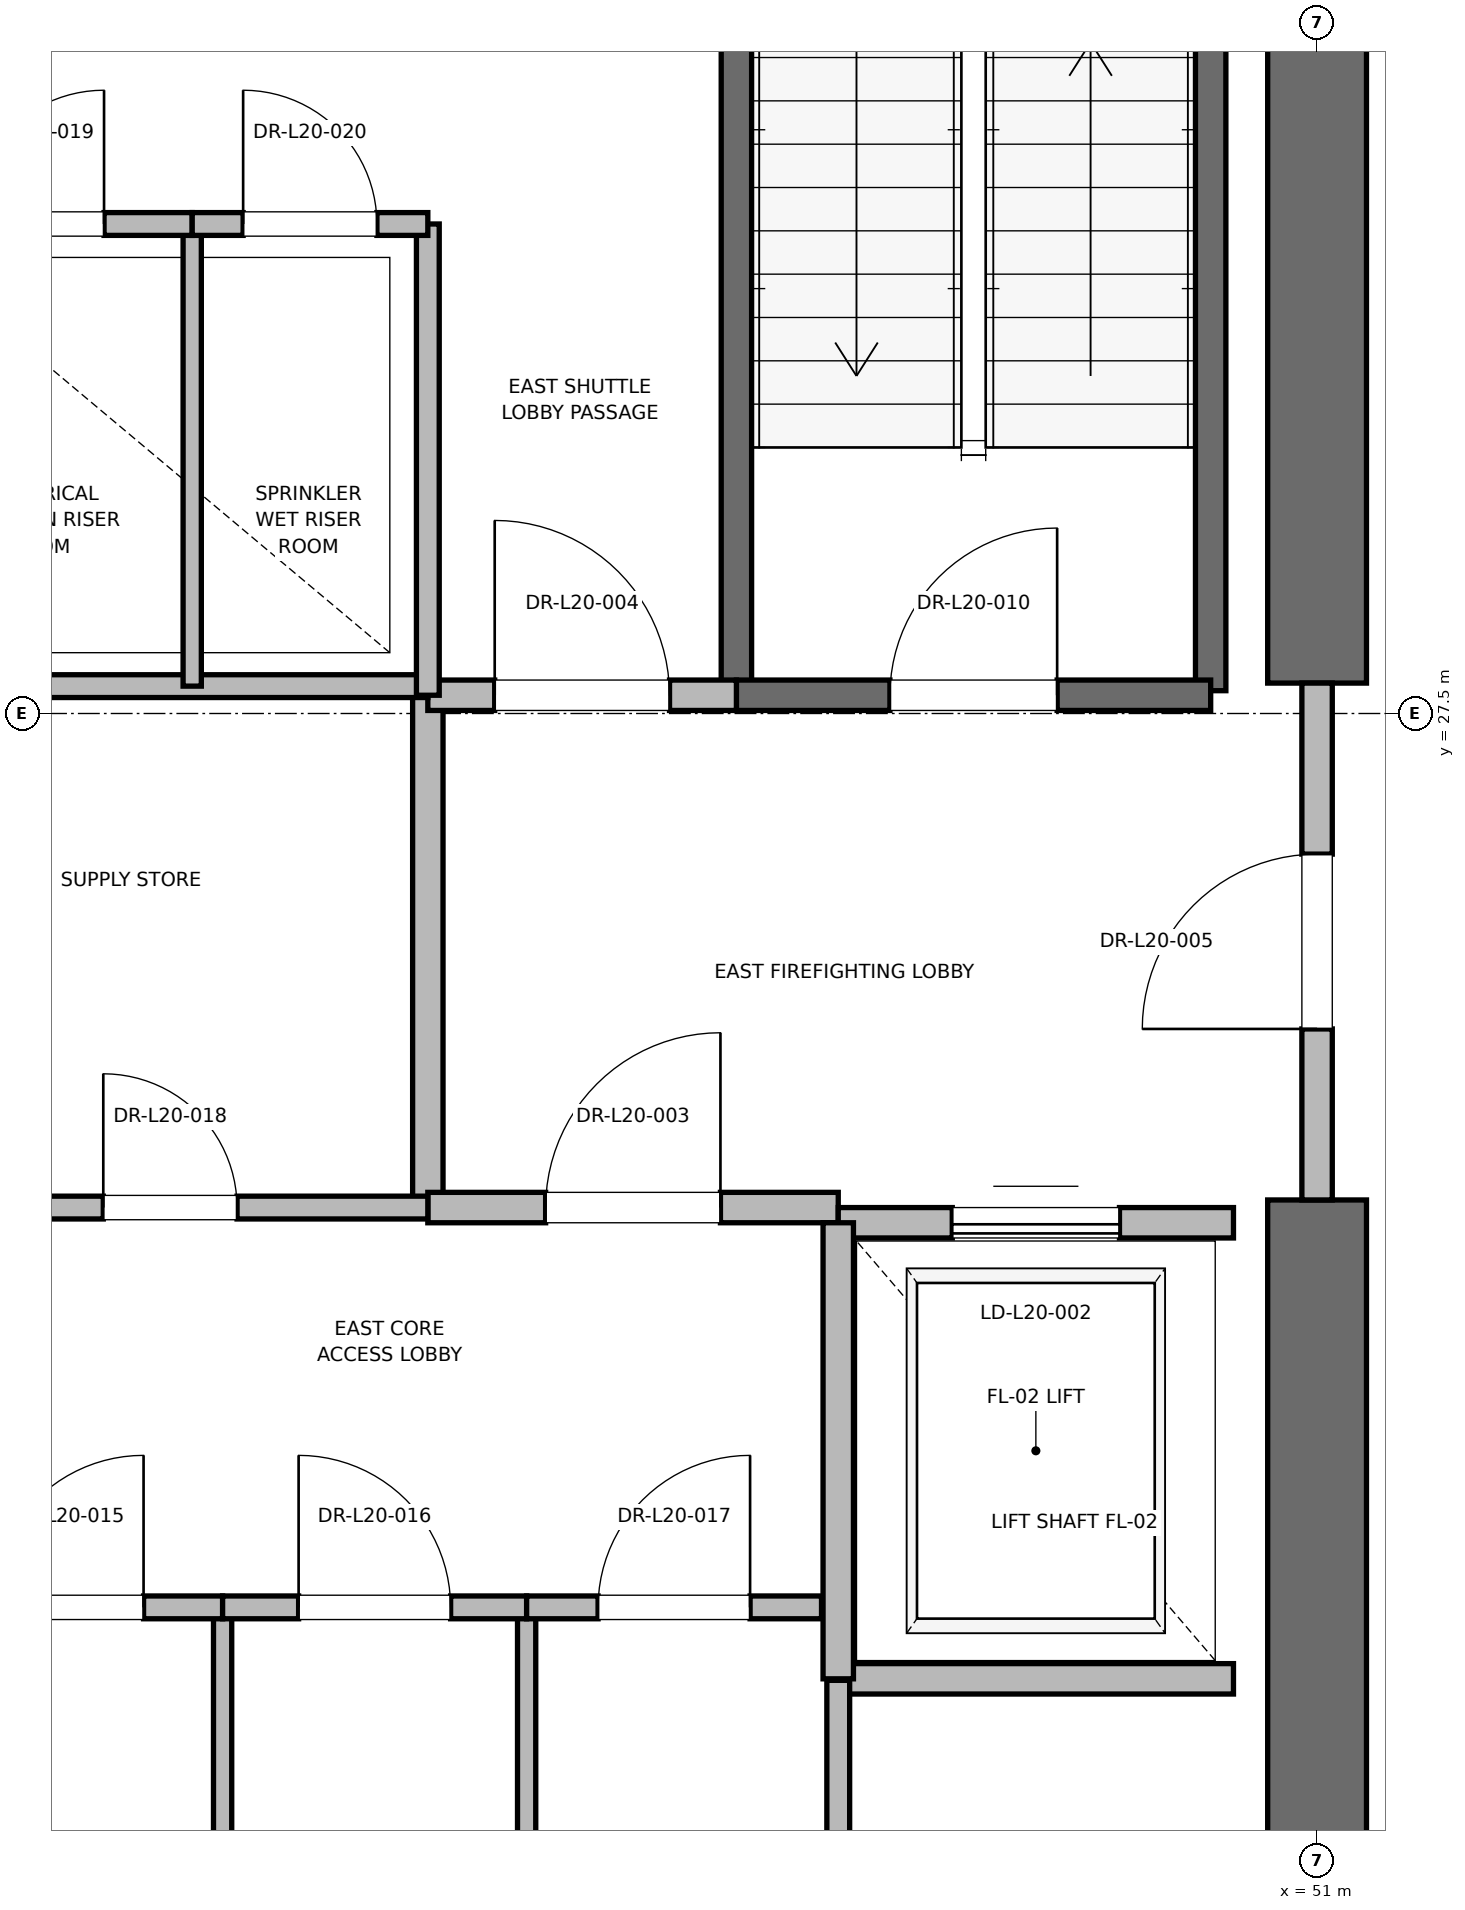
"""IFC4 building model, lengths in metres.
Left out: names, types, materials, properties, quantities, classifications, styles, units other than length and angle.
Written with IfcOpenShell. Run it as: python <this file> out.ifc"""

import sys

from ifc_helpers import new_model, si_unit, direction, frame, frame_2d, origin, place, context, subcontext, project, spatial, rectangle, extrude, element, fill, save


model = new_model("IFC4")
c1 = context("Model", 3, precision=1e-05, world=origin(), true_north=direction((0.0, 1.0)))
c2 = subcontext(c1, "Body", "Model", "MODEL_VIEW")
j1 = project(units=[si_unit("LENGTHUNIT", "METRE"), si_unit("PLANEANGLEUNIT", "RADIAN")], contexts=[c1])
p1 = place(None, origin())
s1 = spatial("IfcSite", under=j1, at=p1, CompositionType="ELEMENT")
p2 = place(p1, origin())
s2 = spatial("IfcBuilding", under=s1, at=p2, CompositionType="ELEMENT")
p3 = place(p2, frame((0.0, 0.0, 87.6)))
s3 = spatial("IfcBuildingStorey", under=s2, at=p3, CompositionType="ELEMENT", Elevation=87.6)
p4 = place(p3, frame((51.0, 18.5, 0.0), z_axis=(0.0, 0.0, 1.0), x_axis=(0.0, 1.0, 0.0)))
e1 = element("IfcWall", 1, at=p4, inside=s3, PredefinedType="SHEAR", context=c2, shape_type="SweptSolid", body=[
    extrude(rectangle(XDim=5.8, YDim=0.65, at=frame_2d((2.9, 0.0))), origin(), (0.0, 0.0, 1.0), 3.76),
])
p5 = place(p3, frame((51.0, 27.7, 0.0), z_axis=(0.0, 0.0, 1.0), x_axis=(0.0, 1.0, 0.0)))
e2 = element("IfcWall", 2, at=p5, inside=s3, PredefinedType="SHEAR", context=c2, shape_type="SweptSolid", body=[
    extrude(rectangle(XDim=8.8, YDim=0.65, at=frame_2d((4.4, 0.0))), origin(), (0.0, 0.0, 1.0), 3.76),
])
p6 = place(p3, frame((50.3, 27.65, 0.0), z_axis=(0.0, 0.0, 1.0), x_axis=(0.0, 1.0, 0.0)))
e3 = element("IfcWall", 3, at=p6, inside=s3, PredefinedType="SOLIDWALL", context=c2, shape_type="SweptSolid", body=[
    extrude(rectangle(XDim=8.15, YDim=0.2, at=frame_2d((4.075, 0.0))), origin(), (0.0, 0.0, 1.0), 3.76),
])
p7 = place(p3, frame((47.18, 27.62, 0.0), z_axis=(0.0, 0.0, 1.0), x_axis=(0.0, 1.0, 0.0)))
e4 = element("IfcWall", 4, at=p7, inside=s3, PredefinedType="SOLIDWALL", context=c2, shape_type="SweptSolid", body=[
    extrude(rectangle(XDim=8.18, YDim=0.2, at=frame_2d((4.09, 0.0))), origin(), (0.0, 0.0, 1.0), 3.76),
])
p8 = place(p3, frame((47.18, 27.62, 0.0), z_axis=(0.0, 0.0, 1.0), x_axis=(1.0, 0.0, 0.0)))
e5 = element("IfcWall", 5, at=p8, inside=s3, PredefinedType="SOLIDWALL", context=c2, shape_type="SweptSolid", body=[
    extrude(rectangle(XDim=3.12, YDim=0.2, at=frame_2d((1.56, 0.0))), origin(), (0.0, 0.0, 1.0), 3.76),
])
p9 = place(p8, frame((1.01, 0.0, 0.0)))
e6 = element("IfcOpeningElement", 6, at=p9, cuts=e5, PredefinedType="OPENING", context=c2, shape_type="SweptSolid", body=[
    extrude(rectangle(XDim=1.1, YDim=2.15, at=frame_2d((0.55, 1.075))), frame((0.0, 0.1, 0.0), z_axis=(0.0, -1.0, 0.0), x_axis=(1.0, 0.0, 0.0)), (0.0, 0.0, 1.0), 0.2),
])
p10 = place(p3, frame((45.15, 24.25, 0.0), z_axis=(0.0, 0.0, 1.0), x_axis=(0.0, 1.0, 0.0)))
e7 = element("IfcWall", 7, at=p10, inside=s3, PredefinedType="PARTITIONING", context=c2, shape_type="SweptSolid", body=[
    extrude(rectangle(XDim=3.37, YDim=0.2, at=frame_2d((1.685, 0.0))), origin(), (0.0, 0.0, 1.0), 3.76),
])
p11 = place(p3, frame((45.15, 24.25, 0.0), z_axis=(0.0, 0.0, 1.0), x_axis=(1.0, 0.0, 0.0)))
e8 = element("IfcWall", 8, at=p11, inside=s3, PredefinedType="PARTITIONING", context=c2, shape_type="SweptSolid", body=[
    extrude(rectangle(XDim=2.7, YDim=0.2, at=frame_2d((1.35, 0.0))), origin(), (0.0, 0.0, 1.0), 3.76),
])
p12 = place(p11, frame((0.775, 0.0, 0.0)))
e9 = element("IfcOpeningElement", 9, at=p12, cuts=e8, PredefinedType="OPENING", context=c2, shape_type="SweptSolid", body=[
    extrude(rectangle(XDim=1.15, YDim=2.2, at=frame_2d((0.575, 1.1))), frame((0.0, 0.1, 0.0), z_axis=(0.0, -1.0, 0.0), x_axis=(1.0, 0.0, 0.0)), (0.0, 0.0, 1.0), 0.2),
])
p13 = place(p3, frame((45.15, 27.62, 0.0), z_axis=(0.0, 0.0, 1.0), x_axis=(1.0, 0.0, 0.0)))
e10 = element("IfcWall", 10, at=p13, inside=s3, PredefinedType="PARTITIONING", context=c2, shape_type="SweptSolid", body=[
    extrude(rectangle(XDim=2.03, YDim=0.2, at=frame_2d((1.015, 0.0))), origin(), (0.0, 0.0, 1.0), 3.76),
])
p14 = place(p13, frame((0.44, 0.0, 0.0)))
e11 = element("IfcOpeningElement", 11, at=p14, cuts=e10, PredefinedType="OPENING", context=c2, shape_type="SweptSolid", body=[
    extrude(rectangle(XDim=1.15, YDim=2.2, at=frame_2d((0.575, 1.1))), frame((0.0, 0.1, 0.0), z_axis=(0.0, -1.0, 0.0), x_axis=(1.0, 0.0, 0.0)), (0.0, 0.0, 1.0), 0.2),
])
p15 = place(p3, frame((51.0, 24.3, 0.0), z_axis=(0.0, 0.0, 1.0), x_axis=(0.0, 1.0, 0.0)))
e12 = element("IfcWall", 12, at=p15, inside=s3, PredefinedType="PARTITIONING", context=c2, shape_type="SweptSolid", body=[
    extrude(rectangle(XDim=3.4, YDim=0.2, at=frame_2d((1.7, 0.0))), origin(), (0.0, 0.0, 1.0), 2.54),
])
p16 = place(p15, frame((1.125, 0.0, 0.0)))
e13 = element("IfcOpeningElement", 13, at=p16, cuts=e12, PredefinedType="OPENING", context=c2, shape_type="SweptSolid", body=[
    extrude(rectangle(XDim=1.15, YDim=2.2, at=frame_2d((0.575, 1.1))), frame((0.0, 0.1, 0.0), z_axis=(0.0, -1.0, 0.0), x_axis=(1.0, 0.0, 0.0)), (0.0, 0.0, 1.0), 0.2),
])
p17 = place(p3, frame((47.85, 21.15, 0.0), z_axis=(0.0, 0.0, 1.0), x_axis=(1.0, 0.0, 0.0)))
e14 = element("IfcWall", 14, at=p17, inside=s3, PredefinedType="SOLIDWALL", context=c2, shape_type="SweptSolid", body=[
    extrude(rectangle(XDim=2.6, YDim=0.2, at=frame_2d((1.3, 0.0))), origin(), (0.0, 0.0, 1.0), 3.76),
])
p18 = place(p3, frame((50.45, 24.15, 0.0), z_axis=(0.0, 0.0, 1.0), x_axis=(-1.0, 0.0, 0.0)))
e15 = element("IfcWall", 15, at=p18, inside=s3, PredefinedType="SOLIDWALL", context=c2, shape_type="SweptSolid", body=[
    extrude(rectangle(XDim=2.6, YDim=0.2, at=frame_2d((1.3, 0.0))), origin(), (0.0, 0.0, 1.0), 2.54),
])
p19 = place(p18, frame((0.75, 0.0, 0.0)))
e16 = element("IfcOpeningElement", 16, at=p19, cuts=e15, PredefinedType="OPENING", context=c2, shape_type="SweptSolid", body=[
    extrude(rectangle(XDim=1.1, YDim=2.2, at=frame_2d((0.55, 1.1))), frame((0.0, 0.1, 0.0), z_axis=(0.0, -1.0, 0.0), x_axis=(1.0, 0.0, 0.0)), (0.0, 0.0, 1.0), 0.2),
])
p20 = place(p3, frame((47.85, 24.15, 0.0), z_axis=(0.0, 0.0, 1.0), x_axis=(0.0, -1.0, 0.0)))
e17 = element("IfcWall", 17, at=p20, inside=s3, PredefinedType="SOLIDWALL", context=c2, shape_type="SweptSolid", body=[
    extrude(rectangle(XDim=3.0, YDim=0.2, at=frame_2d((1.5, 0.0))), origin(), (0.0, 0.0, 1.0), 3.76),
])
p21 = place(p3, frame((41.56, 27.68, 0.0), z_axis=(0.0, 0.0, 1.0), x_axis=(1.0, 0.0, 0.0)))
e18 = element("IfcWall", 18, at=p21, inside=s3, PredefinedType="PARTITIONING", context=c2, shape_type="SweptSolid", body=[
    extrude(rectangle(XDim=3.59, YDim=0.15, at=frame_2d((1.795, 0.0))), origin(), (0.0, 0.0, 1.0), 2.85),
])
p22 = place(p3, frame((47.85, 18.6, 0.0), z_axis=(0.0, 0.0, 1.0), x_axis=(0.0, 1.0, 0.0)))
e19 = element("IfcWall", 19, at=p22, inside=s3, PredefinedType="PARTITIONING", context=c2, shape_type="SweptSolid", body=[
    extrude(rectangle(XDim=2.54, YDim=0.15, at=frame_2d((1.27, 0.0))), origin(), (0.0, 0.0, 1.0), 2.85),
])
for number, where, z_axis, x_axis in (
    (20, (43.8, 18.6, 0.0), (0.0, 0.0, 1.0), (0.0, 1.0, 0.0)),
    (21, (45.8, 18.6, 0.0), (0.0, 0.0, 1.0), (0.0, 1.0, 0.0)),
):
    element("IfcWall", number, at=place(p3, frame(where, z_axis=z_axis, x_axis=x_axis)), inside=s3, PredefinedType="PARTITIONING", context=c2, shape_type="SweptSolid", body=[
        extrude(rectangle(XDim=3.02, YDim=0.12, at=frame_2d((1.51, 0.0))), origin(), (0.0, 0.0, 1.0), 2.85),
    ])
p23 = place(p3, frame((41.76, 21.62, 0.0), z_axis=(0.0, 0.0, 1.0), x_axis=(1.0, 0.0, 0.0)))
e22 = element("IfcWall", 22, at=p23, inside=s3, PredefinedType="PARTITIONING", context=c2, shape_type="SweptSolid", body=[
    extrude(rectangle(XDim=2.04, YDim=0.15, at=frame_2d((1.02, 0.0))), origin(), (0.0, 0.0, 1.0), 2.85),
])
p24 = place(p23, frame((0.52, 0.0, 0.0)))
e23 = element("IfcOpeningElement", 23, at=p24, cuts=e22, PredefinedType="OPENING", context=c2, shape_type="SweptSolid", body=[
    extrude(rectangle(XDim=1.0, YDim=2.15, at=frame_2d((0.5, 1.075))), frame((0.0, 0.075, 0.0), z_axis=(0.0, -1.0, 0.0), x_axis=(1.0, 0.0, 0.0)), (0.0, 0.0, 1.0), 0.15),
])
p25 = place(p3, frame((43.8, 21.62, 0.0), z_axis=(0.0, 0.0, 1.0), x_axis=(1.0, 0.0, 0.0)))
e24 = element("IfcWall", 24, at=p25, inside=s3, PredefinedType="PARTITIONING", context=c2, shape_type="SweptSolid", body=[
    extrude(rectangle(XDim=2.0, YDim=0.15, at=frame_2d((1.0, 0.0))), origin(), (0.0, 0.0, 1.0), 2.85),
])
p26 = place(p25, frame((0.5, 0.0, 0.0)))
e25 = element("IfcOpeningElement", 25, at=p26, cuts=e24, PredefinedType="OPENING", context=c2, shape_type="SweptSolid", body=[
    extrude(rectangle(XDim=1.0, YDim=2.15, at=frame_2d((0.5, 1.075))), frame((0.0, 0.075, 0.0), z_axis=(0.0, -1.0, 0.0), x_axis=(1.0, 0.0, 0.0)), (0.0, 0.0, 1.0), 0.15),
])
p27 = place(p3, frame((45.8, 21.62, 0.0), z_axis=(0.0, 0.0, 1.0), x_axis=(1.0, 0.0, 0.0)))
e26 = element("IfcWall", 26, at=p27, inside=s3, PredefinedType="PARTITIONING", context=c2, shape_type="SweptSolid", body=[
    extrude(rectangle(XDim=1.94, YDim=0.15, at=frame_2d((0.97, 0.0))), origin(), (0.0, 0.0, 1.0), 2.85),
])
p28 = place(p27, frame((0.47, 0.0, 0.0)))
e27 = element("IfcOpeningElement", 27, at=p28, cuts=e26, PredefinedType="OPENING", context=c2, shape_type="SweptSolid", body=[
    extrude(rectangle(XDim=1.0, YDim=2.15, at=frame_2d((0.5, 1.075))), frame((0.0, 0.075, 0.0), z_axis=(0.0, -1.0, 0.0), x_axis=(1.0, 0.0, 0.0)), (0.0, 0.0, 1.0), 0.15),
])
p29 = place(p3, frame((41.76, 24.25, 0.0), z_axis=(0.0, 0.0, 1.0), x_axis=(1.0, 0.0, 0.0)))
e28 = element("IfcWall", 28, at=p29, inside=s3, PredefinedType="PARTITIONING", context=c2, shape_type="SweptSolid", body=[
    extrude(rectangle(XDim=3.39, YDim=0.15, at=frame_2d((1.695, 0.0))), origin(), (0.0, 0.0, 1.0), 2.85),
])
p30 = place(p29, frame((1.255, 0.0, 0.0)))
e29 = element("IfcOpeningElement", 29, at=p30, cuts=e28, PredefinedType="OPENING", context=c2, shape_type="SweptSolid", body=[
    extrude(rectangle(XDim=0.88, YDim=2.1, at=frame_2d((0.44, 1.05))), frame((0.0, 0.075, 0.0), z_axis=(0.0, -1.0, 0.0), x_axis=(1.0, 0.0, 0.0)), (0.0, 0.0, 1.0), 0.15),
])
p31 = place(p3, frame((45.15, 27.62, 0.0), z_axis=(0.0, 0.0, 1.0), x_axis=(0.0, 1.0, 0.0)))
e30 = element("IfcWall", 30, at=p31, inside=s3, PredefinedType="PARTITIONING", context=c2, shape_type="SweptSolid", body=[
    extrude(rectangle(XDim=3.1, YDim=0.15, at=frame_2d((1.55, 0.0))), origin(), (0.0, 0.0, 1.0), 2.85),
])
p32 = place(p3, frame((43.6, 27.68, 0.0), z_axis=(0.0, 0.0, 1.0), x_axis=(0.0, 1.0, 0.0)))
e31 = element("IfcWall", 31, at=p32, inside=s3, PredefinedType="PARTITIONING", context=c2, shape_type="SweptSolid", body=[
    extrude(rectangle(XDim=3.04, YDim=0.12, at=frame_2d((1.52, 0.0))), origin(), (0.0, 0.0, 1.0), 2.85),
])
p33 = place(p3, frame((41.56, 30.72, 0.0), z_axis=(0.0, 0.0, 1.0), x_axis=(1.0, 0.0, 0.0)))
e32 = element("IfcWall", 32, at=p33, inside=s3, PredefinedType="PARTITIONING", context=c2, shape_type="SweptSolid", body=[
    extrude(rectangle(XDim=2.04, YDim=0.15, at=frame_2d((1.02, 0.0))), origin(), (0.0, 0.0, 1.0), 2.85),
])
p34 = place(p33, frame((0.58, 0.0, 0.0)))
e33 = element("IfcOpeningElement", 33, at=p34, cuts=e32, PredefinedType="OPENING", context=c2, shape_type="SweptSolid", body=[
    extrude(rectangle(XDim=0.88, YDim=2.1, at=frame_2d((0.44, 1.05))), frame((0.0, 0.075, 0.0), z_axis=(0.0, -1.0, 0.0), x_axis=(1.0, 0.0, 0.0)), (0.0, 0.0, 1.0), 0.15),
])
p35 = place(p3, frame((43.6, 30.72, 0.0), z_axis=(0.0, 0.0, 1.0), x_axis=(1.0, 0.0, 0.0)))
e34 = element("IfcWall", 34, at=p35, inside=s3, PredefinedType="PARTITIONING", context=c2, shape_type="SweptSolid", body=[
    extrude(rectangle(XDim=1.55, YDim=0.15, at=frame_2d((0.775, 0.0))), origin(), (0.0, 0.0, 1.0), 2.85),
])
p36 = place(p35, frame((0.335, 0.0, 0.0)))
e35 = element("IfcOpeningElement", 35, at=p36, cuts=e34, PredefinedType="OPENING", context=c2, shape_type="SweptSolid", body=[
    extrude(rectangle(XDim=0.88, YDim=2.1, at=frame_2d((0.44, 1.05))), frame((0.0, 0.075, 0.0), z_axis=(0.0, -1.0, 0.0), x_axis=(1.0, 0.0, 0.0)), (0.0, 0.0, 1.0), 0.15),
])
p37 = place(p9, origin())
e36 = element("IfcDoor", 36, at=p37, inside=s3, OperationType="SINGLE_SWING_RIGHT", PredefinedType="DOOR", context=c2, shape_type="SweptSolid", body=[
    extrude(rectangle(XDim=1.1, YDim=2.15, at=frame_2d((0.55, 1.075))), frame((0.0, 0.025, 0.0), z_axis=(0.0, -1.0, 0.0), x_axis=(1.0, 0.0, 0.0)), (0.0, 0.0, 1.0), 0.05),
])
fill(e6, e36)
p38 = place(p12, origin())
e37 = element("IfcDoor", 37, at=p38, inside=s3, OperationType="SINGLE_SWING_RIGHT", PredefinedType="DOOR", context=c2, shape_type="SweptSolid", body=[
    extrude(rectangle(XDim=1.15, YDim=2.2, at=frame_2d((0.575, 1.1))), frame((0.0, 0.025, 0.0), z_axis=(0.0, -1.0, 0.0), x_axis=(1.0, 0.0, 0.0)), (0.0, 0.0, 1.0), 0.05),
])
fill(e9, e37)
p39 = place(p14, origin())
e38 = element("IfcDoor", 38, at=p39, inside=s3, OperationType="SINGLE_SWING_LEFT", PredefinedType="DOOR", context=c2, shape_type="SweptSolid", body=[
    extrude(rectangle(XDim=1.15, YDim=2.2, at=frame_2d((0.575, 1.1))), frame((0.0, 0.025, 0.0), z_axis=(0.0, -1.0, 0.0), x_axis=(1.0, 0.0, 0.0)), (0.0, 0.0, 1.0), 0.05),
])
fill(e11, e38)
p40 = place(p16, origin())
e39 = element("IfcDoor", 39, at=p40, inside=s3, OperationType="SINGLE_SWING_LEFT", PredefinedType="DOOR", context=c2, shape_type="SweptSolid", body=[
    extrude(rectangle(XDim=1.15, YDim=2.2, at=frame_2d((0.575, 1.1))), frame((0.0, 0.025, 0.0), z_axis=(0.0, -1.0, 0.0), x_axis=(1.0, 0.0, 0.0)), (0.0, 0.0, 1.0), 0.05),
])
fill(e13, e39)
p41 = place(p19, origin())
e40 = element("IfcDoor", 40, at=p41, inside=s3, OperationType="SLIDING_TO_RIGHT", PredefinedType="DOOR", context=c2, shape_type="SweptSolid", body=[
    extrude(rectangle(XDim=1.1, YDim=2.2, at=frame_2d((0.55, 1.1))), frame((0.0, 0.025, 0.0), z_axis=(0.0, -1.0, 0.0), x_axis=(1.0, 0.0, 0.0)), (0.0, 0.0, 1.0), 0.05),
])
fill(e16, e40)
p42 = place(p24, origin())
e41 = element("IfcDoor", 41, at=p42, inside=s3, OperationType="SINGLE_SWING_RIGHT", PredefinedType="DOOR", context=c2, shape_type="SweptSolid", body=[
    extrude(rectangle(XDim=1.0, YDim=2.15, at=frame_2d((0.5, 1.075))), frame((0.0, 0.025, 0.0), z_axis=(0.0, -1.0, 0.0), x_axis=(1.0, 0.0, 0.0)), (0.0, 0.0, 1.0), 0.05),
])
fill(e23, e41)
p43 = place(p26, origin())
e42 = element("IfcDoor", 42, at=p43, inside=s3, OperationType="SINGLE_SWING_LEFT", PredefinedType="DOOR", context=c2, shape_type="SweptSolid", body=[
    extrude(rectangle(XDim=1.0, YDim=2.15, at=frame_2d((0.5, 1.075))), frame((0.0, 0.025, 0.0), z_axis=(0.0, -1.0, 0.0), x_axis=(1.0, 0.0, 0.0)), (0.0, 0.0, 1.0), 0.05),
])
fill(e25, e42)
p44 = place(p28, origin())
e43 = element("IfcDoor", 43, at=p44, inside=s3, OperationType="SINGLE_SWING_RIGHT", PredefinedType="DOOR", context=c2, shape_type="SweptSolid", body=[
    extrude(rectangle(XDim=1.0, YDim=2.15, at=frame_2d((0.5, 1.075))), frame((0.0, 0.025, 0.0), z_axis=(0.0, -1.0, 0.0), x_axis=(1.0, 0.0, 0.0)), (0.0, 0.0, 1.0), 0.05),
])
fill(e27, e43)
p45 = place(p30, origin())
e44 = element("IfcDoor", 44, at=p45, inside=s3, OperationType="SINGLE_SWING_LEFT", PredefinedType="DOOR", context=c2, shape_type="SweptSolid", body=[
    extrude(rectangle(XDim=0.88, YDim=2.1, at=frame_2d((0.44, 1.05))), frame((0.0, 0.025, 0.0), z_axis=(0.0, -1.0, 0.0), x_axis=(1.0, 0.0, 0.0)), (0.0, 0.0, 1.0), 0.05),
])
fill(e29, e44)
p46 = place(p34, origin())
e45 = element("IfcDoor", 45, at=p46, inside=s3, OperationType="SINGLE_SWING_RIGHT", PredefinedType="DOOR", context=c2, shape_type="SweptSolid", body=[
    extrude(rectangle(XDim=0.88, YDim=2.1, at=frame_2d((0.44, 1.05))), frame((0.0, 0.025, 0.0), z_axis=(0.0, -1.0, 0.0), x_axis=(1.0, 0.0, 0.0)), (0.0, 0.0, 1.0), 0.05),
])
fill(e33, e45)
p47 = place(p36, origin())
e46 = element("IfcDoor", 46, at=p47, inside=s3, OperationType="SINGLE_SWING_LEFT", PredefinedType="DOOR", context=c2, shape_type="SweptSolid", body=[
    extrude(rectangle(XDim=0.88, YDim=2.1, at=frame_2d((0.44, 1.05))), frame((0.0, 0.025, 0.0), z_axis=(0.0, -1.0, 0.0), x_axis=(1.0, 0.0, 0.0)), (0.0, 0.0, 1.0), 0.05),
])
fill(e35, e46)
save(model, sys.argv[1])
